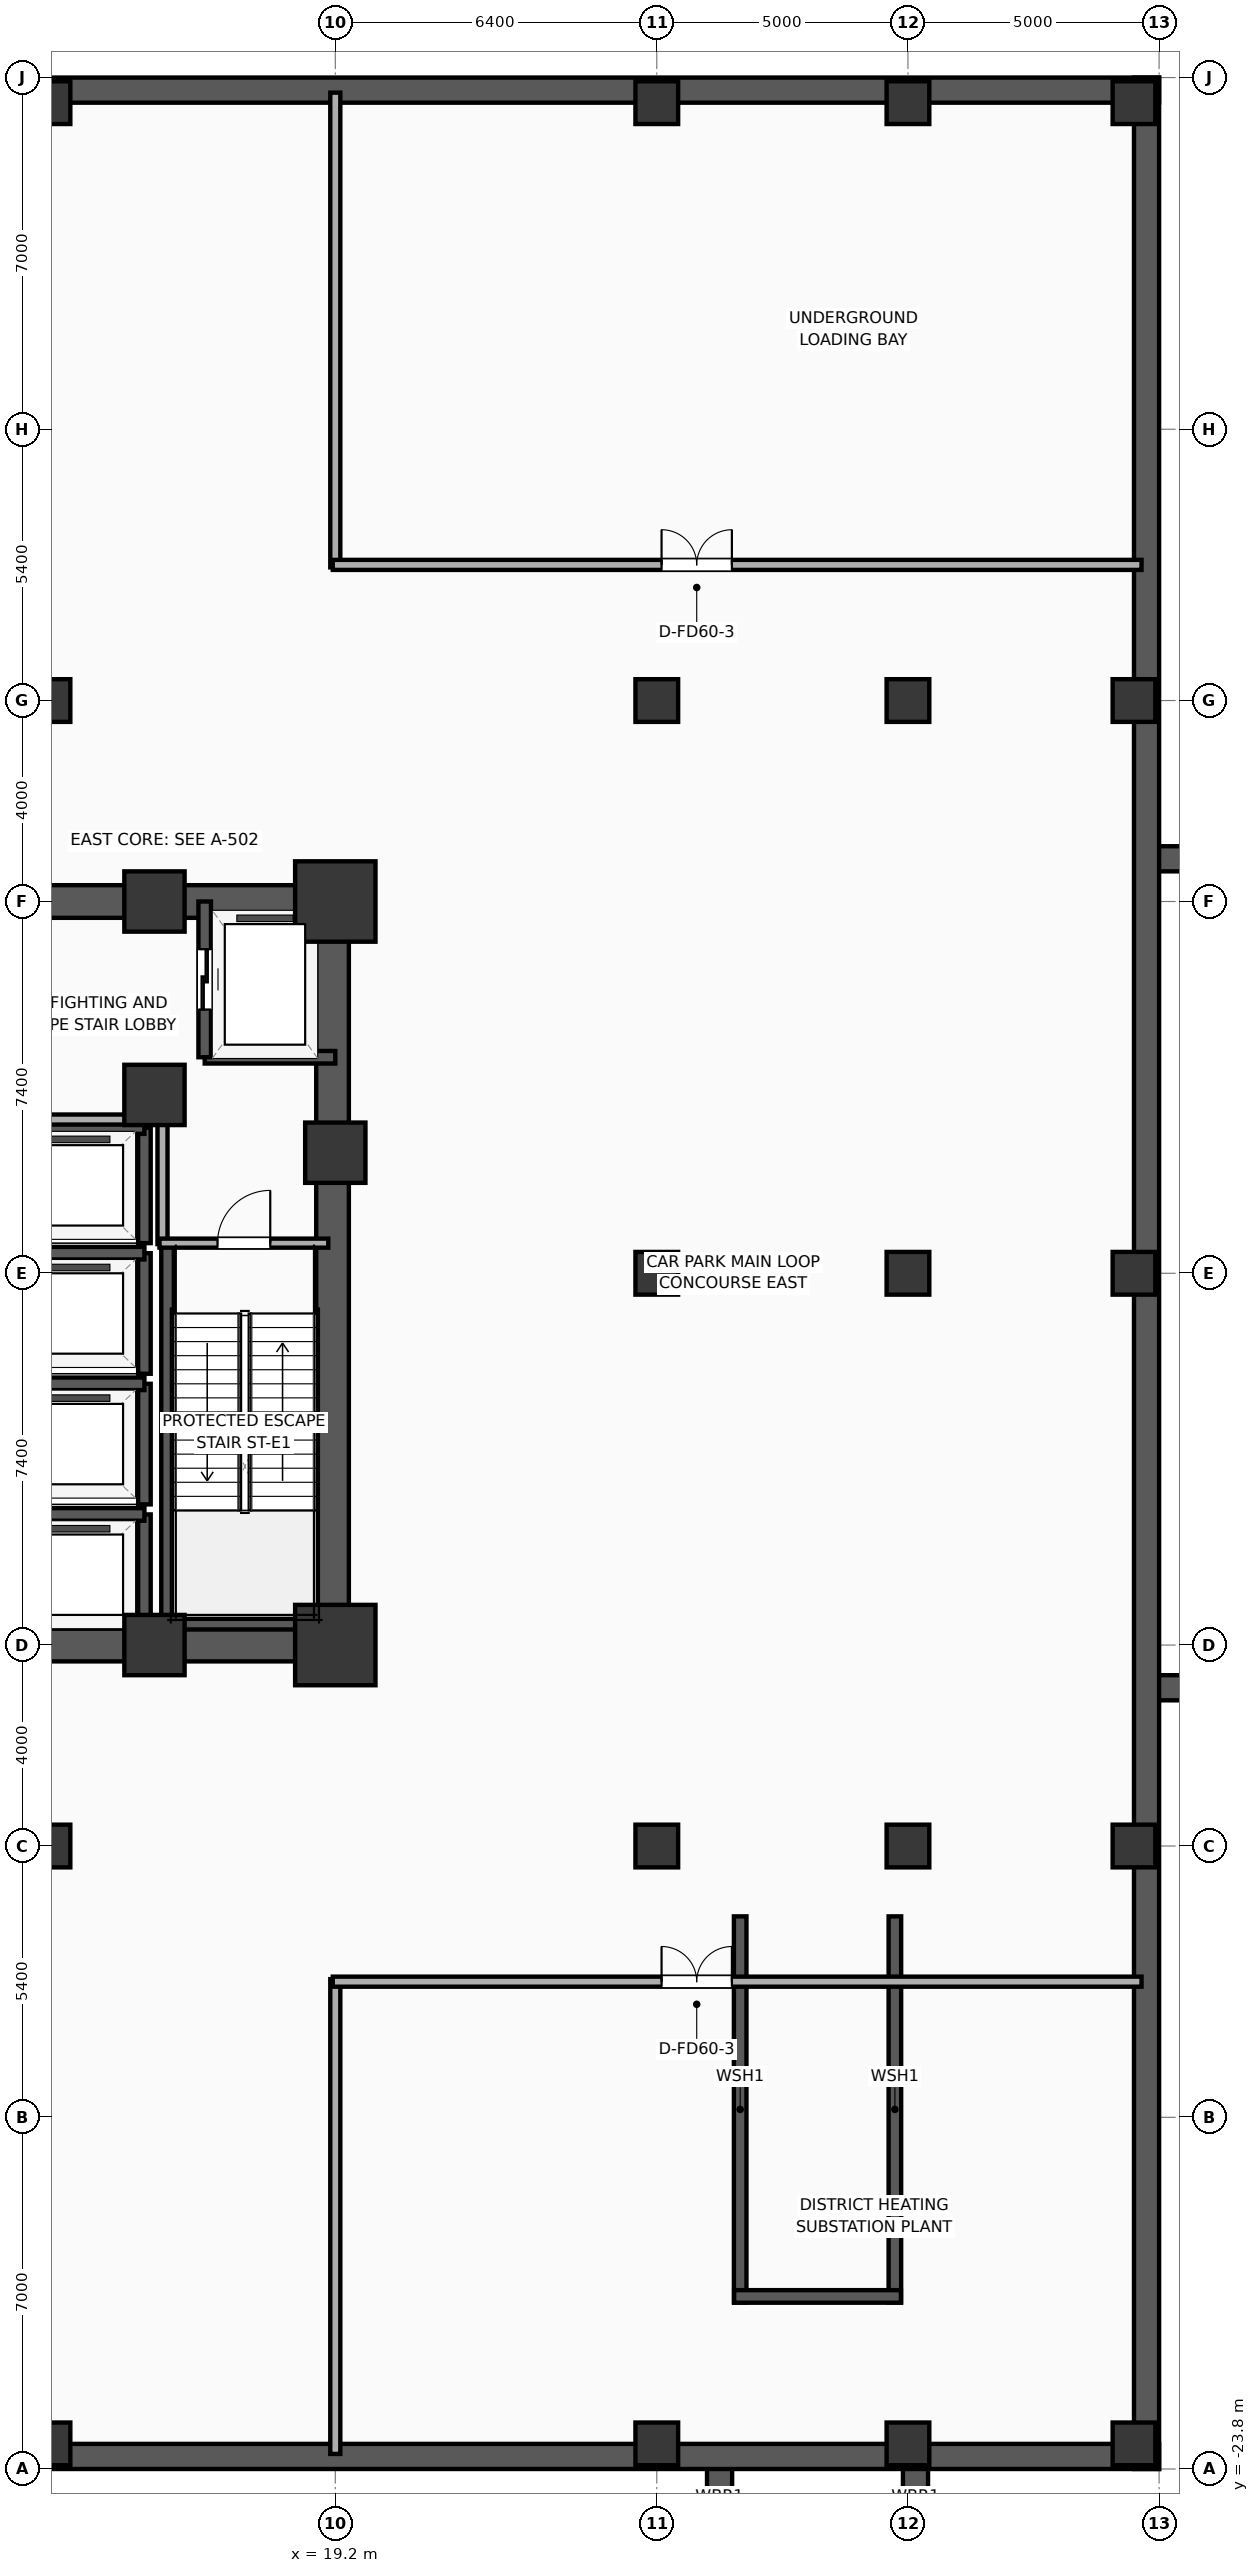
"""IFC4 building model, lengths in metres.
Left out: names, types, materials, properties, quantities, classifications, styles, units other than length and angle.
Written with IfcOpenShell. Run it as: python <this file> out.ifc"""

import sys

from ifc_helpers import new_model, si_unit, direction, frame, frame_2d, origin, origin_2d, place, context, subcontext, project, spatial, rectangle, extrude, element, fill, save


model = new_model("IFC4")
c1 = context("Model", 3, precision=1e-05, world=origin(), true_north=direction((0.0, 1.0)))
c2 = subcontext(c1, "Body", "Model", "MODEL_VIEW")
j1 = project(units=[si_unit("LENGTHUNIT", "METRE"), si_unit("PLANEANGLEUNIT", "RADIAN")], contexts=[c1])
p1 = place(None, origin())
s1 = spatial("IfcSite", under=j1, at=p1, CompositionType="ELEMENT")
p2 = place(p1, origin())
s2 = spatial("IfcBuilding", under=s1, at=p2, CompositionType="ELEMENT")
p3 = place(p2, frame((0.0, 0.0, -5.2)))
s3 = spatial("IfcBuildingStorey", under=s2, at=p3, CompositionType="ELEMENT", Elevation=-5.2)
for number, where, z_axis, x_axis in (
    (1, (26.85, -26.95, 0.0), (0.0, 0.0, 1.0), (0.0, 1.0, 0.0)),
    (2, (30.75, -26.95, 0.0), (0.0, 0.0, 1.0), (0.0, 1.0, 0.0)),
):
    element("IfcWall", number, at=place(p3, frame(where, z_axis=z_axis, x_axis=x_axis)), inside=s3, PredefinedType="USERDEFINED", context=c2, shape_type="SweptSolid", body=[
        extrude(rectangle(XDim=3.4, YDim=0.5, at=frame_2d((1.7, 0.0))), origin(), (0.0, 0.0, 1.0), 5.02),
    ])
for number, where, z_axis, x_axis in (
    (3, (35.35, -8.25, 0.0), (0.0, 0.0, 1.0), (1.0, 0.0, 0.0)),
    (4, (35.35, 8.25, 0.0), (0.0, 0.0, 1.0), (1.0, 0.0, 0.0)),
):
    element("IfcWall", number, at=place(p3, frame(where, z_axis=z_axis, x_axis=x_axis)), inside=s3, PredefinedType="USERDEFINED", context=c2, shape_type="SweptSolid", body=[
        extrude(rectangle(XDim=6.0, YDim=0.5, at=frame_2d((3.0, 0.0))), origin(), (0.0, 0.0, 1.0), 5.02),
    ])
for number, where, z_axis, x_axis in (
    (5, (15.6, 3.55, 0.0), (0.0, 0.0, 1.0), (1.0, 0.0, 0.0)),
    (6, (15.6, -7.4, 0.0), (0.0, 0.0, 1.0), (1.0, 0.0, 0.0)),
    (7, (15.6, 7.4, 0.0), (0.0, 0.0, 1.0), (1.0, 0.0, 0.0)),
):
    element("IfcColumn", number, at=place(p3, frame(where, z_axis=z_axis, x_axis=x_axis)), inside=s3, PredefinedType="COLUMN", context=c2, shape_type="SweptSolid", body=[
        extrude(rectangle(XDim=1.2, YDim=1.2, at=origin_2d()), origin(), (0.0, 0.0, 1.0), 5.2),
    ])
p4 = place(p3, frame((19.2, -7.4, 0.0), z_axis=(0.0, 0.0, 1.0), x_axis=(1.0, 0.0, 0.0)))
e8 = element("IfcColumn", 8, at=p4, inside=s3, PredefinedType="COLUMN", context=c2, shape_type="SweptSolid", body=[
    extrude(rectangle(XDim=1.6, YDim=1.6, at=origin_2d()), origin(), (0.0, 0.0, 1.0), 5.2),
])
p5 = place(p3, frame((19.2, 2.4, 0.0), z_axis=(0.0, 0.0, 1.0), x_axis=(1.0, 0.0, 0.0)))
e9 = element("IfcColumn", 9, at=p5, inside=s3, PredefinedType="COLUMN", context=c2, shape_type="SweptSolid", body=[
    extrude(rectangle(XDim=1.2, YDim=1.2, at=origin_2d()), origin(), (0.0, 0.0, 1.0), 5.2),
])
p6 = place(p3, frame((19.2, 7.4, 0.0), z_axis=(0.0, 0.0, 1.0), x_axis=(1.0, 0.0, 0.0)))
e10 = element("IfcColumn", 10, at=p6, inside=s3, PredefinedType="COLUMN", context=c2, shape_type="SweptSolid", body=[
    extrude(rectangle(XDim=1.6, YDim=1.6, at=origin_2d()), origin(), (0.0, 0.0, 1.0), 5.2),
])
for number, where, z_axis, x_axis in (
    (11, (12.075, -7.4, 0.0), (0.0, 0.0, 1.0), (1.0, 0.0, 0.0)),
    (12, (12.075, 7.4, 0.0), (0.0, 0.0, 1.0), (1.0, 0.0, 0.0)),
):
    element("IfcWall", number, at=place(p3, frame(where, z_axis=z_axis, x_axis=x_axis)), inside=s3, PredefinedType="SHEAR", context=c2, shape_type="SweptSolid", body=[
        extrude(rectangle(XDim=7.45, YDim=0.65, at=frame_2d((3.725, 0.0))), origin(), (0.0, 0.0, 1.0), 4.92),
    ])
p7 = place(p3, frame((19.145, -7.4, 0.0), z_axis=(0.0, 0.0, 1.0), x_axis=(0.0, 1.0, 0.0)))
e13 = element("IfcWall", 13, at=p7, inside=s3, PredefinedType="SHEAR", context=c2, shape_type="SweptSolid", body=[
    extrude(rectangle(XDim=14.8, YDim=0.65, at=frame_2d((7.4, 0.0))), origin(), (0.0, 0.0, 1.0), 4.92),
])
p8 = place(p3, frame((15.86, -7.085, 0.0), z_axis=(0.0, 0.0, 1.0), x_axis=(0.0, 1.0, 0.0)))
e14 = element("IfcWall", 14, at=p8, inside=s3, PredefinedType="SOLIDWALL", context=c2, shape_type="SweptSolid", body=[
    extrude(rectangle(XDim=7.685, YDim=0.25, at=frame_2d((3.843, 0.0))), origin(), (0.0, 0.0, 1.0), 4.92),
])
p9 = place(p3, frame((15.74, -6.965, 0.0), z_axis=(0.0, 0.0, 1.0), x_axis=(1.0, 0.0, 0.0)))
e15 = element("IfcWall", 15, at=p9, inside=s3, PredefinedType="SOLIDWALL", context=c2, shape_type="SweptSolid", body=[
    extrude(rectangle(XDim=3.46, YDim=0.25, at=frame_2d((1.73, 0.0))), origin(), (0.0, 0.0, 1.0), 4.92),
])
for number, where, z_axis, x_axis in (
    (16, (27.26, -20.485, 0.0), (0.0, 0.0, 1.0), (0.0, 1.0, 0.0)),
    (17, (30.34, -20.485, 0.0), (0.0, 0.0, 1.0), (0.0, 1.0, 0.0)),
):
    element("IfcWall", number, at=place(p3, frame(where, z_axis=z_axis, x_axis=x_axis)), inside=s3, PredefinedType="SOLIDWALL", context=c2, shape_type="SweptSolid", body=[
        extrude(rectangle(XDim=7.685, YDim=0.25, at=frame_2d((3.843, 0.0))), origin(), (0.0, 0.0, 1.0), 4.92),
    ])
p10 = place(p3, frame((27.14, -20.365, 0.0), z_axis=(0.0, 0.0, 1.0), x_axis=(1.0, 0.0, 0.0)))
e18 = element("IfcWall", 18, at=p10, inside=s3, PredefinedType="SOLIDWALL", context=c2, shape_type="SweptSolid", body=[
    extrude(rectangle(XDim=3.32, YDim=0.25, at=frame_2d((1.66, 0.0))), origin(), (0.0, 0.0, 1.0), 4.92),
])
for number, where, z_axis, x_axis in (
    (19, (-38.4, -23.55, 0.0), (0.0, 0.0, 1.0), (1.0, 0.0, 0.0)),
    (20, (-38.4, 23.55, 0.0), (0.0, 0.0, 1.0), (1.0, 0.0, 0.0)),
):
    element("IfcWall", number, at=place(p3, frame(where, z_axis=z_axis, x_axis=x_axis)), inside=s3, PredefinedType="USERDEFINED", context=c2, shape_type="SweptSolid", body=[
        extrude(rectangle(XDim=74.0, YDim=0.5, at=frame_2d((37.0, 0.0))), origin(), (0.0, 0.0, 1.0), 4.92),
    ])
p11 = place(p3, frame((35.35, -23.8, 0.0), z_axis=(0.0, 0.0, 1.0), x_axis=(0.0, 1.0, 0.0)))
e21 = element("IfcWall", 21, at=p11, inside=s3, PredefinedType="USERDEFINED", context=c2, shape_type="SweptSolid", body=[
    extrude(rectangle(XDim=47.6, YDim=0.5, at=frame_2d((23.8, 0.0))), origin(), (0.0, 0.0, 1.0), 4.92),
])
for number, where, z_axis, x_axis in (
    (22, (13.5, -23.3, 0.0), (0.0, 0.0, 1.0), (1.0, 0.0, 0.0)),
    (23, (13.5, -11.4, 0.0), (0.0, 0.0, 1.0), (1.0, 0.0, 0.0)),
    (24, (13.5, 11.4, 0.0), (0.0, 0.0, 1.0), (1.0, 0.0, 0.0)),
    (25, (13.5, 23.3, 0.0), (0.0, 0.0, 1.0), (1.0, 0.0, 0.0)),
    (26, (25.6, -23.3, 0.0), (0.0, 0.0, 1.0), (1.0, 0.0, 0.0)),
    (27, (25.6, -11.4, 0.0), (0.0, 0.0, 1.0), (1.0, 0.0, 0.0)),
    (28, (25.6, 0.0, 0.0), (0.0, 0.0, 1.0), (1.0, 0.0, 0.0)),
    (29, (25.6, 11.4, 0.0), (0.0, 0.0, 1.0), (1.0, 0.0, 0.0)),
    (30, (25.6, 23.3, 0.0), (0.0, 0.0, 1.0), (1.0, 0.0, 0.0)),
    (31, (30.6, -23.3, 0.0), (0.0, 0.0, 1.0), (1.0, 0.0, 0.0)),
    (32, (30.6, -11.4, 0.0), (0.0, 0.0, 1.0), (1.0, 0.0, 0.0)),
    (33, (30.6, 0.0, 0.0), (0.0, 0.0, 1.0), (1.0, 0.0, 0.0)),
    (34, (30.6, 11.4, 0.0), (0.0, 0.0, 1.0), (1.0, 0.0, 0.0)),
    (35, (30.6, 23.3, 0.0), (0.0, 0.0, 1.0), (1.0, 0.0, 0.0)),
    (36, (35.1, -23.3, 0.0), (0.0, 0.0, 1.0), (1.0, 0.0, 0.0)),
    (37, (35.1, -11.4, 0.0), (0.0, 0.0, 1.0), (1.0, 0.0, 0.0)),
    (38, (35.1, 0.0, 0.0), (0.0, 0.0, 1.0), (1.0, 0.0, 0.0)),
    (39, (35.1, 11.4, 0.0), (0.0, 0.0, 1.0), (1.0, 0.0, 0.0)),
    (40, (35.1, 23.3, 0.0), (0.0, 0.0, 1.0), (1.0, 0.0, 0.0)),
):
    element("IfcColumn", number, at=place(p3, frame(where, z_axis=z_axis, x_axis=x_axis)), inside=s3, PredefinedType="COLUMN", context=c2, shape_type="SweptSolid", body=[
        extrude(rectangle(XDim=0.85, YDim=0.85, at=origin_2d()), origin(), (0.0, 0.0, 1.0), 5.2),
    ])
p12 = place(p3, frame((16.6, 4.3, 0.0), z_axis=(0.0, 0.0, 1.0), x_axis=(1.0, 0.0, 0.0)))
e41 = element("IfcWall", 41, at=p12, inside=s3, PredefinedType="SOLIDWALL", context=c2, shape_type="SweptSolid", body=[
    extrude(rectangle(XDim=2.6, YDim=0.25, at=frame_2d((1.3, 0.0))), origin(), (0.0, 0.0, 1.0), 4.92),
])
p13 = place(p3, frame((16.6, 7.4, 0.0), z_axis=(0.0, 0.0, 1.0), x_axis=(0.0, -1.0, 0.0)))
e42 = element("IfcWall", 42, at=p13, inside=s3, PredefinedType="SOLIDWALL", context=c2, shape_type="SweptSolid", body=[
    extrude(rectangle(XDim=3.1, YDim=0.25, at=frame_2d((1.55, 0.0))), origin(), (0.0, 0.0, 1.0), 4.92),
])
p14 = place(p13, frame((0.95, 0.0, 0.0)))
e43 = element("IfcOpeningElement", 43, at=p14, cuts=e42, PredefinedType="OPENING", context=c2, shape_type="SweptSolid", body=[
    extrude(rectangle(XDim=1.2, YDim=2.05, at=frame_2d((0.6, 1.025))), frame((0.0, 0.135, 0.0), z_axis=(0.0, -1.0, 0.0), x_axis=(1.0, 0.0, 0.0)), (0.0, 0.0, 1.0), 0.27),
])
p15 = place(p3, frame((15.4, -7.4, 0.0), z_axis=(0.0, 0.0, 1.0), x_axis=(0.0, 1.0, 0.0)))
e44 = element("IfcWall", 44, at=p15, inside=s3, PredefinedType="SOLIDWALL", context=c2, shape_type="SweptSolid", body=[
    extrude(rectangle(XDim=2.6, YDim=0.25, at=frame_2d((1.3, 0.0))), origin(), (0.0, 0.0, 1.0), 4.92),
])
p16 = place(p3, frame((15.4, -4.8, 0.0), z_axis=(0.0, 0.0, 1.0), x_axis=(-1.0, 0.0, 0.0)))
e45 = element("IfcWall", 45, at=p16, inside=s3, PredefinedType="SOLIDWALL", context=c2, shape_type="SweptSolid", body=[
    extrude(rectangle(XDim=3.0, YDim=0.25, at=frame_2d((1.5, 0.0))), origin(), (0.0, 0.0, 1.0), 4.92),
])
p17 = place(p3, frame((15.4, -4.6, 0.0), z_axis=(0.0, 0.0, 1.0), x_axis=(0.0, 1.0, 0.0)))
e46 = element("IfcWall", 46, at=p17, inside=s3, PredefinedType="SOLIDWALL", context=c2, shape_type="SweptSolid", body=[
    extrude(rectangle(XDim=2.4, YDim=0.25, at=frame_2d((1.2, 0.0))), origin(), (0.0, 0.0, 1.0), 4.92),
])
p18 = place(p3, frame((15.4, -2.2, 0.0), z_axis=(0.0, 0.0, 1.0), x_axis=(-1.0, 0.0, 0.0)))
e47 = element("IfcWall", 47, at=p18, inside=s3, PredefinedType="SOLIDWALL", context=c2, shape_type="SweptSolid", body=[
    extrude(rectangle(XDim=3.0, YDim=0.25, at=frame_2d((1.5, 0.0))), origin(), (0.0, 0.0, 1.0), 4.92),
])
p19 = place(p3, frame((15.4, -2.0, 0.0), z_axis=(0.0, 0.0, 1.0), x_axis=(0.0, 1.0, 0.0)))
e48 = element("IfcWall", 48, at=p19, inside=s3, PredefinedType="SOLIDWALL", context=c2, shape_type="SweptSolid", body=[
    extrude(rectangle(XDim=2.4, YDim=0.25, at=frame_2d((1.2, 0.0))), origin(), (0.0, 0.0, 1.0), 4.92),
])
p20 = place(p3, frame((15.4, 0.4, 0.0), z_axis=(0.0, 0.0, 1.0), x_axis=(-1.0, 0.0, 0.0)))
e49 = element("IfcWall", 49, at=p20, inside=s3, PredefinedType="SOLIDWALL", context=c2, shape_type="SweptSolid", body=[
    extrude(rectangle(XDim=3.0, YDim=0.25, at=frame_2d((1.5, 0.0))), origin(), (0.0, 0.0, 1.0), 4.92),
])
p21 = place(p3, frame((15.4, 0.6, 0.0), z_axis=(0.0, 0.0, 1.0), x_axis=(0.0, 1.0, 0.0)))
e50 = element("IfcWall", 50, at=p21, inside=s3, PredefinedType="SOLIDWALL", context=c2, shape_type="SweptSolid", body=[
    extrude(rectangle(XDim=2.3, YDim=0.25, at=frame_2d((1.15, 0.0))), origin(), (0.0, 0.0, 1.0), 4.92),
])
p22 = place(p3, frame((15.4, 2.9, 0.0), z_axis=(0.0, 0.0, 1.0), x_axis=(-1.0, 0.0, 0.0)))
e51 = element("IfcWall", 51, at=p22, inside=s3, PredefinedType="SOLIDWALL", context=c2, shape_type="SweptSolid", body=[
    extrude(rectangle(XDim=3.0, YDim=0.25, at=frame_2d((1.5, 0.0))), origin(), (0.0, 0.0, 1.0), 4.92),
])
p23 = place(p3, frame((15.76, 0.58, 0.0), z_axis=(0.0, 0.0, 1.0), x_axis=(0.0, 1.0, 0.0)))
e52 = element("IfcWall", 52, at=p23, inside=s3, PredefinedType="PARTITIONING", context=c2, shape_type="SweptSolid", body=[
    extrude(rectangle(XDim=2.52, YDim=0.2, at=frame_2d((1.26, 0.0))), origin(), (0.0, 0.0, 1.0), 4.92),
])
p24 = place(p3, frame((12.66, 3.06, 0.0), z_axis=(0.0, 0.0, 1.0), x_axis=(1.0, 0.0, 0.0)))
e53 = element("IfcWall", 53, at=p24, inside=s3, PredefinedType="PARTITIONING", context=c2, shape_type="SweptSolid", body=[
    extrude(rectangle(XDim=3.16, YDim=0.2, at=frame_2d((1.58, 0.0))), origin(), (0.0, 0.0, 1.0), 4.92),
])
p25 = place(p3, frame((15.7, 0.6, 0.0), z_axis=(0.0, 0.0, 1.0), x_axis=(1.0, 0.0, 0.0)))
e54 = element("IfcWall", 54, at=p25, inside=s3, PredefinedType="PARTITIONING", context=c2, shape_type="SweptSolid", body=[
    extrude(rectangle(XDim=3.36, YDim=0.18, at=frame_2d((1.68, 0.0))), origin(), (0.0, 0.0, 1.0), 4.92),
])
p26 = place(p25, frame((1.155, 0.0, 0.0)))
e55 = element("IfcOpeningElement", 55, at=p26, cuts=e54, PredefinedType="OPENING", context=c2, shape_type="SweptSolid", body=[
    extrude(rectangle(XDim=1.05, YDim=2.05, at=frame_2d((0.525, 1.025))), frame((0.0, 0.1, 0.0), z_axis=(0.0, -1.0, 0.0), x_axis=(1.0, 0.0, 0.0)), (0.0, 0.0, 1.0), 0.2),
])
for number, where, z_axis, x_axis in (
    (56, (19.2, -23.5, 0.0), (0.0, 0.0, 1.0), (0.0, 1.0, 0.0)),
    (57, (19.2, 14.05, 0.0), (0.0, 0.0, 1.0), (0.0, 1.0, 0.0)),
):
    element("IfcWall", number, at=place(p3, frame(where, z_axis=z_axis, x_axis=x_axis)), inside=s3, PredefinedType="PARTITIONING", context=c2, shape_type="SweptSolid", body=[
        extrude(rectangle(XDim=9.45, YDim=0.2, at=frame_2d((4.725, 0.0))), origin(), (0.0, 0.0, 1.0), 4.92),
    ])
p27 = place(p3, frame((19.15, -14.1, 0.0), z_axis=(0.0, 0.0, 1.0), x_axis=(1.0, 0.0, 0.0)))
e58 = element("IfcWall", 58, at=p27, inside=s3, PredefinedType="PARTITIONING", context=c2, shape_type="SweptSolid", body=[
    extrude(rectangle(XDim=16.1, YDim=0.2, at=frame_2d((8.05, 0.0))), origin(), (0.0, 0.0, 1.0), 4.92),
])
p28 = place(p27, frame((6.545, 0.0, 0.0)))
e59 = element("IfcOpeningElement", 59, at=p28, cuts=e58, PredefinedType="OPENING", context=c2, shape_type="SweptSolid", body=[
    extrude(rectangle(XDim=1.4, YDim=2.05, at=frame_2d((0.7, 1.025))), frame((0.0, 0.11, 0.0), z_axis=(0.0, -1.0, 0.0), x_axis=(1.0, 0.0, 0.0)), (0.0, 0.0, 1.0), 0.22),
])
p29 = place(p3, frame((19.15, 14.1, 0.0), z_axis=(0.0, 0.0, 1.0), x_axis=(1.0, 0.0, 0.0)))
e60 = element("IfcWall", 60, at=p29, inside=s3, PredefinedType="PARTITIONING", context=c2, shape_type="SweptSolid", body=[
    extrude(rectangle(XDim=16.1, YDim=0.2, at=frame_2d((8.05, 0.0))), origin(), (0.0, 0.0, 1.0), 4.92),
])
p30 = place(p29, frame((6.545, 0.0, 0.0)))
e61 = element("IfcOpeningElement", 61, at=p30, cuts=e60, PredefinedType="OPENING", context=c2, shape_type="SweptSolid", body=[
    extrude(rectangle(XDim=1.4, YDim=2.05, at=frame_2d((0.7, 1.025))), frame((0.0, 0.11, 0.0), z_axis=(0.0, -1.0, 0.0), x_axis=(1.0, 0.0, 0.0)), (0.0, 0.0, 1.0), 0.22),
])
p31 = place(p14, origin())
e62 = element("IfcDoor", 62, at=p31, inside=s3, OperationType="SLIDING_TO_LEFT", PredefinedType="DOOR", context=c2, shape_type="SweptSolid", body=[
    extrude(rectangle(XDim=1.2, YDim=2.05, at=frame_2d((0.6, 1.025))), frame((0.0, 0.025, 0.0), z_axis=(0.0, -1.0, 0.0), x_axis=(1.0, 0.0, 0.0)), (0.0, 0.0, 1.0), 0.05),
])
fill(e43, e62)
p32 = place(p26, origin())
e63 = element("IfcDoor", 63, at=p32, inside=s3, OperationType="SINGLE_SWING_RIGHT", PredefinedType="DOOR", context=c2, shape_type="SweptSolid", body=[
    extrude(rectangle(XDim=1.05, YDim=2.05, at=frame_2d((0.525, 1.025))), frame((0.0, 0.025, 0.0), z_axis=(0.0, -1.0, 0.0), x_axis=(1.0, 0.0, 0.0)), (0.0, 0.0, 1.0), 0.05),
])
fill(e55, e63)
p33 = place(p28, origin())
e64 = element("IfcDoor", 64, at=p33, inside=s3, OperationType="DOUBLE_DOOR_SINGLE_SWING", PredefinedType="DOOR", context=c2, shape_type="SweptSolid", body=[
    extrude(rectangle(XDim=1.4, YDim=2.05, at=frame_2d((0.7, 1.025))), frame((0.0, 0.025, 0.0), z_axis=(0.0, -1.0, 0.0), x_axis=(1.0, 0.0, 0.0)), (0.0, 0.0, 1.0), 0.05),
])
fill(e59, e64)
p34 = place(p30, origin())
e65 = element("IfcDoor", 65, at=p34, inside=s3, OperationType="DOUBLE_DOOR_SINGLE_SWING", PredefinedType="DOOR", context=c2, shape_type="SweptSolid", body=[
    extrude(rectangle(XDim=1.4, YDim=2.05, at=frame_2d((0.7, 1.025))), frame((0.0, 0.025, 0.0), z_axis=(0.0, -1.0, 0.0), x_axis=(1.0, 0.0, 0.0)), (0.0, 0.0, 1.0), 0.05),
])
fill(e61, e65)
save(model, sys.argv[1])
